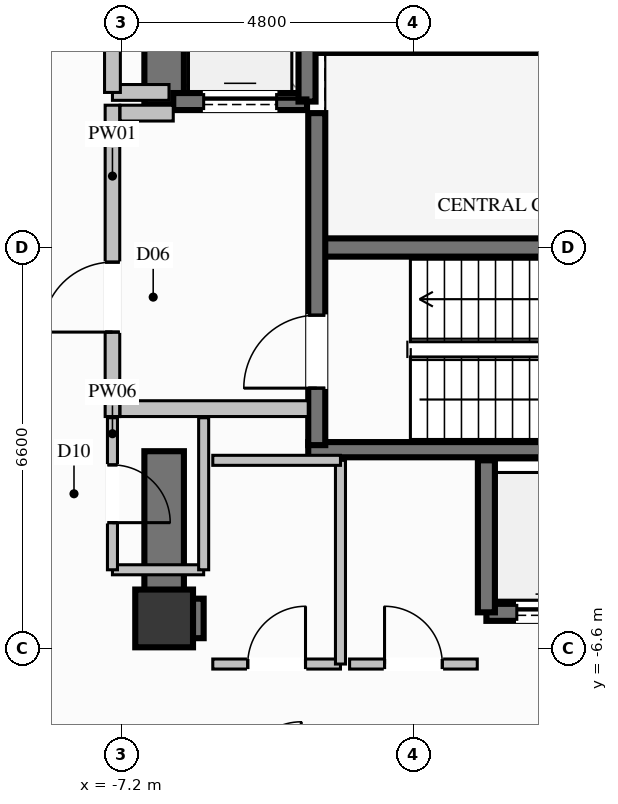
"""IFC4 building model, lengths in metres.
Left out: names, types, materials, properties, quantities, classifications, styles, units other than length and angle.
Written with IfcOpenShell. Run it as: python <this file> out.ifc"""

import sys

from ifc_helpers import new_model, si_unit, direction, frame, frame_2d, origin, origin_2d, place, context, subcontext, project, spatial, rectangle, extrude, element, fill, save


model = new_model("IFC4")
c1 = context("Model", 3, precision=1e-05, world=origin(), true_north=direction((0.0, 1.0)))
c2 = subcontext(c1, "Body", "Model", "MODEL_VIEW")
j1 = project(units=[si_unit("LENGTHUNIT", "METRE"), si_unit("PLANEANGLEUNIT", "RADIAN")], contexts=[c1])
p1 = place(None, origin())
s1 = spatial("IfcSite", under=j1, at=p1, CompositionType="ELEMENT")
p2 = place(p1, origin())
s2 = spatial("IfcBuilding", under=s1, at=p2, CompositionType="ELEMENT")
p3 = place(p2, frame((0.0, 0.0, 153.0)))
s3 = spatial("IfcBuildingStorey", under=s2, at=p3, CompositionType="ELEMENT", Elevation=153.0)
p4 = place(p3, frame((-6.5, -6.1, 0.0), z_axis=(0.0, 0.0, 1.0), x_axis=(1.0, 0.0, 0.0)))
e1 = element("IfcColumn", 1, at=p4, inside=s3, PredefinedType="COLUMN", context=c2, shape_type="SweptSolid", body=[
    extrude(rectangle(XDim=0.95, YDim=0.95, at=origin_2d()), origin(), (0.0, 0.0, 1.0), 3.6),
])
p5 = place(p3, frame((-3.99, 0.0, 0.0), z_axis=(0.0, 0.0, 1.0), x_axis=(1.0, 0.0, 0.0)))
e2 = element("IfcWall", 2, at=p5, inside=s3, PredefinedType="SHEAR", context=c2, shape_type="SweptSolid", body=[
    extrude(rectangle(XDim=7.98, YDim=0.3, at=frame_2d((3.99, 0.0))), origin(), (0.0, 0.0, 1.0), 3.6),
])
for number, where, z_axis, x_axis in (
    (3, (-4.13, -3.325, 0.0), (0.0, 0.0, 1.0), (1.0, 0.0, 0.0)),
    (4, (-4.13, 3.325, 0.0), (0.0, 0.0, 1.0), (1.0, 0.0, 0.0)),
):
    element("IfcWall", number, at=place(p3, frame(where, z_axis=z_axis, x_axis=x_axis)), inside=s3, PredefinedType="SOLIDWALL", context=c2, shape_type="SweptSolid", body=[
        extrude(rectangle(XDim=8.26, YDim=0.25, at=frame_2d((4.13, 0.0))), origin(), (0.0, 0.0, 1.0), 3.6),
    ])
p6 = place(p3, frame((-6.175, -6.1, 0.0), z_axis=(0.0, 0.0, 1.0), x_axis=(1.0, 0.0, 0.0)))
e5 = element("IfcWall", 5, at=p6, inside=s3, PredefinedType="SHEAR", context=c2, shape_type="SweptSolid", body=[
    extrude(rectangle(XDim=0.325, YDim=0.65, at=frame_2d((0.163, 0.0))), origin(), (0.0, 0.0, 1.0), 3.6),
])
p7 = place(p3, frame((-6.5, 2.35, 0.0), z_axis=(0.0, 0.0, 1.0), x_axis=(0.0, 1.0, 0.0)))
e6 = element("IfcWall", 6, at=p7, inside=s3, PredefinedType="SHEAR", context=c2, shape_type="SweptSolid", body=[
    extrude(rectangle(XDim=4.075, YDim=0.65, at=frame_2d((2.038, 0.0))), origin(), (0.0, 0.0, 1.0), 3.6),
])
p8 = place(p3, frame((-6.5, -6.425, 0.0), z_axis=(0.0, 0.0, 1.0), x_axis=(0.0, 1.0, 0.0)))
e7 = element("IfcWall", 7, at=p8, inside=s3, PredefinedType="SHEAR", context=c2, shape_type="SweptSolid", body=[
    extrude(rectangle(XDim=3.075, YDim=0.65, at=frame_2d((1.538, 0.0))), origin(), (0.0, 0.0, 1.0), 3.6),
])
p9 = place(p3, frame((-1.2, -6.0, 0.0), z_axis=(0.0, 0.0, 1.0), x_axis=(1.0, 0.0, 0.0)))
e8 = element("IfcWall", 8, at=p9, inside=s3, PredefinedType="SOLIDWALL", context=c2, shape_type="SweptSolid", body=[
    extrude(rectangle(XDim=2.1, YDim=0.28, at=frame_2d((1.05, 0.0))), origin(), (0.0, 0.0, 1.0), 3.35),
])
p10 = place(p9, frame((0.5, 0.0, 0.0)))
e9 = element("IfcOpeningElement", 9, at=p10, cuts=e8, PredefinedType="OPENING", context=c2, shape_type="SweptSolid", body=[
    extrude(rectangle(XDim=1.1, YDim=2.2, at=frame_2d((0.55, 1.1))), frame((0.0, 0.15, 0.0), z_axis=(0.0, -1.0, 0.0), x_axis=(1.0, 0.0, 0.0)), (0.0, 0.0, 1.0), 0.3),
])
p11 = place(p3, frame((-1.2, -3.5, 0.0), z_axis=(0.0, 0.0, 1.0), x_axis=(0.0, -1.0, 0.0)))
e10 = element("IfcWall", 10, at=p11, inside=s3, PredefinedType="SOLIDWALL", context=c2, shape_type="SweptSolid", body=[
    extrude(rectangle(XDim=2.5, YDim=0.28, at=frame_2d((1.25, 0.0))), origin(), (0.0, 0.0, 1.0), 3.35),
])
p12 = place(p3, frame((-6.35, 2.4, 0.0), z_axis=(0.0, 0.0, 1.0), x_axis=(1.0, 0.0, 0.0)))
e11 = element("IfcWall", 11, at=p12, inside=s3, PredefinedType="SOLIDWALL", context=c2, shape_type="SweptSolid", body=[
    extrude(rectangle(XDim=2.2, YDim=0.28, at=frame_2d((1.1, 0.0))), origin(), (0.0, 0.0, 1.0), 3.35),
])
p13 = place(p12, frame((0.5, 0.0, 0.0)))
e12 = element("IfcOpeningElement", 12, at=p13, cuts=e11, PredefinedType="OPENING", context=c2, shape_type="SweptSolid", body=[
    extrude(rectangle(XDim=1.2, YDim=2.2, at=frame_2d((0.6, 1.1))), frame((0.0, 0.15, 0.0), z_axis=(0.0, -1.0, 0.0), x_axis=(1.0, 0.0, 0.0)), (0.0, 0.0, 1.0), 0.3),
])
p14 = place(p3, frame((-4.15, 2.4, 0.0), z_axis=(0.0, 0.0, 1.0), x_axis=(0.0, 1.0, 0.0)))
e13 = element("IfcWall", 13, at=p14, inside=s3, PredefinedType="SOLIDWALL", context=c2, shape_type="SweptSolid", body=[
    extrude(rectangle(XDim=2.7, YDim=0.28, at=frame_2d((1.35, 0.0))), origin(), (0.0, 0.0, 1.0), 3.35),
])
p15 = place(p3, frame((-3.99, -3.25, 0.0), z_axis=(0.0, 0.0, 1.0), x_axis=(0.0, 1.0, 0.0)))
e14 = element("IfcWall", 14, at=p15, inside=s3, PredefinedType="SOLIDWALL", context=c2, shape_type="SweptSolid", body=[
    extrude(rectangle(XDim=5.46, YDim=0.28, at=frame_2d((2.73, 0.0))), origin(), (0.0, 0.0, 1.0), 3.35),
])
p16 = place(p15, frame((0.937, 0.0, 0.0)))
e15 = element("IfcOpeningElement", 15, at=p16, cuts=e14, PredefinedType="OPENING", context=c2, shape_type="SweptSolid", body=[
    extrude(rectangle(XDim=1.2, YDim=2.2, at=frame_2d((0.6, 1.1))), frame((0.0, 0.15, 0.0), z_axis=(0.0, -1.0, 0.0), x_axis=(1.0, 0.0, 0.0)), (0.0, 0.0, 1.0), 0.3),
])
p17 = place(p3, frame((-7.35, -2.78, 0.0), z_axis=(0.0, 0.0, 1.0), x_axis=(0.0, 1.0, 0.0)))
e16 = element("IfcWall", 16, at=p17, inside=s3, PredefinedType="PARTITIONING", context=c2, shape_type="SweptSolid", body=[
    extrude(rectangle(XDim=5.12, YDim=0.24, at=frame_2d((2.56, 0.0))), origin(), (0.0, 0.0, 1.0), 2.435),
])
p18 = place(p17, frame((1.389, 0.0, 0.0)))
e17 = element("IfcOpeningElement", 17, at=p18, cuts=e16, PredefinedType="OPENING", context=c2, shape_type="SweptSolid", body=[
    extrude(rectangle(XDim=1.15, YDim=2.2, at=frame_2d((0.575, 1.1))), frame((0.0, 0.13, 0.0), z_axis=(0.0, -1.0, 0.0), x_axis=(1.0, 0.0, 0.0)), (0.0, 0.0, 1.0), 0.26),
])
p19 = place(p3, frame((-7.225, -2.65, 0.0), z_axis=(0.0, 0.0, 1.0), x_axis=(1.0, 0.0, 0.0)))
e18 = element("IfcWall", 18, at=p19, inside=s3, PredefinedType="PARTITIONING", context=c2, shape_type="SweptSolid", body=[
    extrude(rectangle(XDim=3.095, YDim=0.26, at=frame_2d((1.548, 0.0))), origin(), (0.0, 0.0, 1.0), 3.35),
])
p20 = place(p3, frame((-7.225, 2.21, 0.0), z_axis=(0.0, 0.0, 1.0), x_axis=(1.0, 0.0, 0.0)))
e19 = element("IfcWall", 19, at=p20, inside=s3, PredefinedType="PARTITIONING", context=c2, shape_type="SweptSolid", body=[
    extrude(rectangle(XDim=0.875, YDim=0.26, at=frame_2d((0.438, 0.0))), origin(), (0.0, 0.0, 1.0), 3.35),
])
p21 = place(p3, frame((-7.35, 2.55, 0.0), z_axis=(0.0, 0.0, 1.0), x_axis=(1.0, 0.0, 0.0)))
e20 = element("IfcWall", 20, at=p21, inside=s3, PredefinedType="PARTITIONING", context=c2, shape_type="SweptSolid", body=[
    extrude(rectangle(XDim=0.93, YDim=0.26, at=frame_2d((0.465, 0.0))), origin(), (0.0, 0.0, 1.0), 3.35),
])
p22 = place(p3, frame((-7.35, 2.55, 0.0), z_axis=(0.0, 0.0, 1.0), x_axis=(0.0, 1.0, 0.0)))
e21 = element("IfcWall", 21, at=p22, inside=s3, PredefinedType="PARTITIONING", context=c2, shape_type="SweptSolid", body=[
    extrude(rectangle(XDim=2.4, YDim=0.26, at=frame_2d((1.2, 0.0))), origin(), (0.0, 0.0, 1.0), 2.435),
])
p23 = place(p22, frame((0.775, 0.0, 0.0)))
e22 = element("IfcOpeningElement", 22, at=p23, cuts=e21, PredefinedType="OPENING", context=c2, shape_type="SweptSolid", body=[
    extrude(rectangle(XDim=0.85, YDim=2.05, at=frame_2d((0.425, 1.025))), frame((0.0, 0.14, 0.0), z_axis=(0.0, -1.0, 0.0), x_axis=(1.0, 0.0, 0.0)), (0.0, 0.0, 1.0), 0.28),
])
p24 = place(p3, frame((-7.35, -5.3, 0.0), z_axis=(0.0, 0.0, 1.0), x_axis=(1.0, 0.0, 0.0)))
e23 = element("IfcWall", 23, at=p24, inside=s3, PredefinedType="PARTITIONING", context=c2, shape_type="SweptSolid", body=[
    extrude(rectangle(XDim=1.5, YDim=0.165, at=frame_2d((0.75, 0.0))), origin(), (0.0, 0.0, 1.0), 2.435),
])
p25 = place(p3, frame((-5.85, -5.3, 0.0), z_axis=(0.0, 0.0, 1.0), x_axis=(0.0, 1.0, 0.0)))
e24 = element("IfcWall", 24, at=p25, inside=s3, PredefinedType="PARTITIONING", context=c2, shape_type="SweptSolid", body=[
    extrude(rectangle(XDim=2.5, YDim=0.165, at=frame_2d((1.25, 0.0))), origin(), (0.0, 0.0, 1.0), 2.435),
])
p26 = place(p3, frame((-7.35, -2.8, 0.0), z_axis=(0.0, 0.0, 1.0), x_axis=(0.0, -1.0, 0.0)))
e25 = element("IfcWall", 25, at=p26, inside=s3, PredefinedType="PARTITIONING", context=c2, shape_type="SweptSolid", body=[
    extrude(rectangle(XDim=2.5, YDim=0.165, at=frame_2d((1.25, 0.0))), origin(), (0.0, 0.0, 1.0), 3.35),
])
p27 = place(p26, frame((0.775, 0.0, 0.0)))
e26 = element("IfcOpeningElement", 26, at=p27, cuts=e25, PredefinedType="OPENING", context=c2, shape_type="SweptSolid", body=[
    extrude(rectangle(XDim=0.95, YDim=2.1, at=frame_2d((0.475, 1.05))), frame((0.0, 0.093, 0.0), z_axis=(0.0, -1.0, 0.0), x_axis=(1.0, 0.0, 0.0)), (0.0, 0.0, 1.0), 0.185),
])
p28 = place(p3, frame((-5.7, -6.85, 0.0), z_axis=(0.0, 0.0, 1.0), x_axis=(1.0, 0.0, 0.0)))
e27 = element("IfcWall", 27, at=p28, inside=s3, PredefinedType="PARTITIONING", context=c2, shape_type="SweptSolid", body=[
    extrude(rectangle(XDim=2.1, YDim=0.165, at=frame_2d((1.05, 0.0))), origin(), (0.0, 0.0, 1.0), 2.435),
])
p29 = place(p28, frame((0.575, 0.0, 0.0)))
e28 = element("IfcOpeningElement", 28, at=p29, cuts=e27, PredefinedType="OPENING", context=c2, shape_type="SweptSolid", body=[
    extrude(rectangle(XDim=0.95, YDim=2.1, at=frame_2d((0.475, 1.05))), frame((0.0, 0.093, 0.0), z_axis=(0.0, -1.0, 0.0), x_axis=(1.0, 0.0, 0.0)), (0.0, 0.0, 1.0), 0.185),
])
p30 = place(p3, frame((-3.6, -6.85, 0.0), z_axis=(0.0, 0.0, 1.0), x_axis=(0.0, 1.0, 0.0)))
e29 = element("IfcWall", 29, at=p30, inside=s3, PredefinedType="PARTITIONING", context=c2, shape_type="SweptSolid", body=[
    extrude(rectangle(XDim=3.35, YDim=0.165, at=frame_2d((1.675, 0.0))), origin(), (0.0, 0.0, 1.0), 3.35),
])
p31 = place(p3, frame((-3.6, -3.5, 0.0), z_axis=(0.0, 0.0, 1.0), x_axis=(-1.0, 0.0, 0.0)))
e30 = element("IfcWall", 30, at=p31, inside=s3, PredefinedType="PARTITIONING", context=c2, shape_type="SweptSolid", body=[
    extrude(rectangle(XDim=2.1, YDim=0.165, at=frame_2d((1.05, 0.0))), origin(), (0.0, 0.0, 1.0), 3.35),
])
p32 = place(p3, frame((-3.45, -6.85, 0.0), z_axis=(0.0, 0.0, 1.0), x_axis=(1.0, 0.0, 0.0)))
e31 = element("IfcWall", 31, at=p32, inside=s3, PredefinedType="PARTITIONING", context=c2, shape_type="SweptSolid", body=[
    extrude(rectangle(XDim=2.1, YDim=0.165, at=frame_2d((1.05, 0.0))), origin(), (0.0, 0.0, 1.0), 2.435),
])
p33 = place(p32, frame((0.575, 0.0, 0.0)))
e32 = element("IfcOpeningElement", 32, at=p33, cuts=e31, PredefinedType="OPENING", context=c2, shape_type="SweptSolid", body=[
    extrude(rectangle(XDim=0.95, YDim=2.1, at=frame_2d((0.475, 1.05))), frame((0.0, 0.093, 0.0), z_axis=(0.0, -1.0, 0.0), x_axis=(1.0, 0.0, 0.0)), (0.0, 0.0, 1.0), 0.185),
])
p34 = place(p10, origin())
e33 = element("IfcDoor", 33, at=p34, inside=s3, OperationType="SLIDING_TO_LEFT", PredefinedType="DOOR", context=c2, shape_type="SweptSolid", body=[
    extrude(rectangle(XDim=1.1, YDim=2.2, at=frame_2d((0.55, 1.1))), frame((0.0, 0.025, 0.0), z_axis=(0.0, -1.0, 0.0), x_axis=(1.0, 0.0, 0.0)), (0.0, 0.0, 1.0), 0.05),
])
fill(e9, e33)
p35 = place(p13, origin())
e34 = element("IfcDoor", 34, at=p35, inside=s3, OperationType="SLIDING_TO_LEFT", PredefinedType="DOOR", context=c2, shape_type="SweptSolid", body=[
    extrude(rectangle(XDim=1.2, YDim=2.2, at=frame_2d((0.6, 1.1))), frame((0.0, 0.025, 0.0), z_axis=(0.0, -1.0, 0.0), x_axis=(1.0, 0.0, 0.0)), (0.0, 0.0, 1.0), 0.05),
])
fill(e12, e34)
p36 = place(p16, origin())
e35 = element("IfcDoor", 35, at=p36, inside=s3, OperationType="SINGLE_SWING_LEFT", PredefinedType="DOOR", context=c2, shape_type="SweptSolid", body=[
    extrude(rectangle(XDim=1.2, YDim=2.2, at=frame_2d((0.6, 1.1))), frame((0.0, 0.025, 0.0), z_axis=(0.0, -1.0, 0.0), x_axis=(1.0, 0.0, 0.0)), (0.0, 0.0, 1.0), 0.05),
])
fill(e15, e35)
p37 = place(p18, origin())
e36 = element("IfcDoor", 36, at=p37, inside=s3, OperationType="SINGLE_SWING_LEFT", PredefinedType="DOOR", context=c2, shape_type="SweptSolid", body=[
    extrude(rectangle(XDim=1.15, YDim=2.2, at=frame_2d((0.575, 1.1))), frame((0.0, 0.025, 0.0), z_axis=(0.0, -1.0, 0.0), x_axis=(1.0, 0.0, 0.0)), (0.0, 0.0, 1.0), 0.05),
])
fill(e17, e36)
p38 = place(p27, origin())
e37 = element("IfcDoor", 37, at=p38, inside=s3, OperationType="SINGLE_SWING_RIGHT", PredefinedType="DOOR", context=c2, shape_type="SweptSolid", body=[
    extrude(rectangle(XDim=0.95, YDim=2.1, at=frame_2d((0.475, 1.05))), frame((0.0, 0.025, 0.0), z_axis=(0.0, -1.0, 0.0), x_axis=(1.0, 0.0, 0.0)), (0.0, 0.0, 1.0), 0.05),
])
fill(e26, e37)
p39 = place(p29, origin())
e38 = element("IfcDoor", 38, at=p39, inside=s3, OperationType="SINGLE_SWING_RIGHT", PredefinedType="DOOR", context=c2, shape_type="SweptSolid", body=[
    extrude(rectangle(XDim=0.95, YDim=2.1, at=frame_2d((0.475, 1.05))), frame((0.0, 0.025, 0.0), z_axis=(0.0, -1.0, 0.0), x_axis=(1.0, 0.0, 0.0)), (0.0, 0.0, 1.0), 0.05),
])
fill(e28, e38)
p40 = place(p33, origin())
e39 = element("IfcDoor", 39, at=p40, inside=s3, OperationType="SINGLE_SWING_LEFT", PredefinedType="DOOR", context=c2, shape_type="SweptSolid", body=[
    extrude(rectangle(XDim=0.95, YDim=2.1, at=frame_2d((0.475, 1.05))), frame((0.0, 0.025, 0.0), z_axis=(0.0, -1.0, 0.0), x_axis=(1.0, 0.0, 0.0)), (0.0, 0.0, 1.0), 0.05),
])
fill(e32, e39)
save(model, sys.argv[1])
